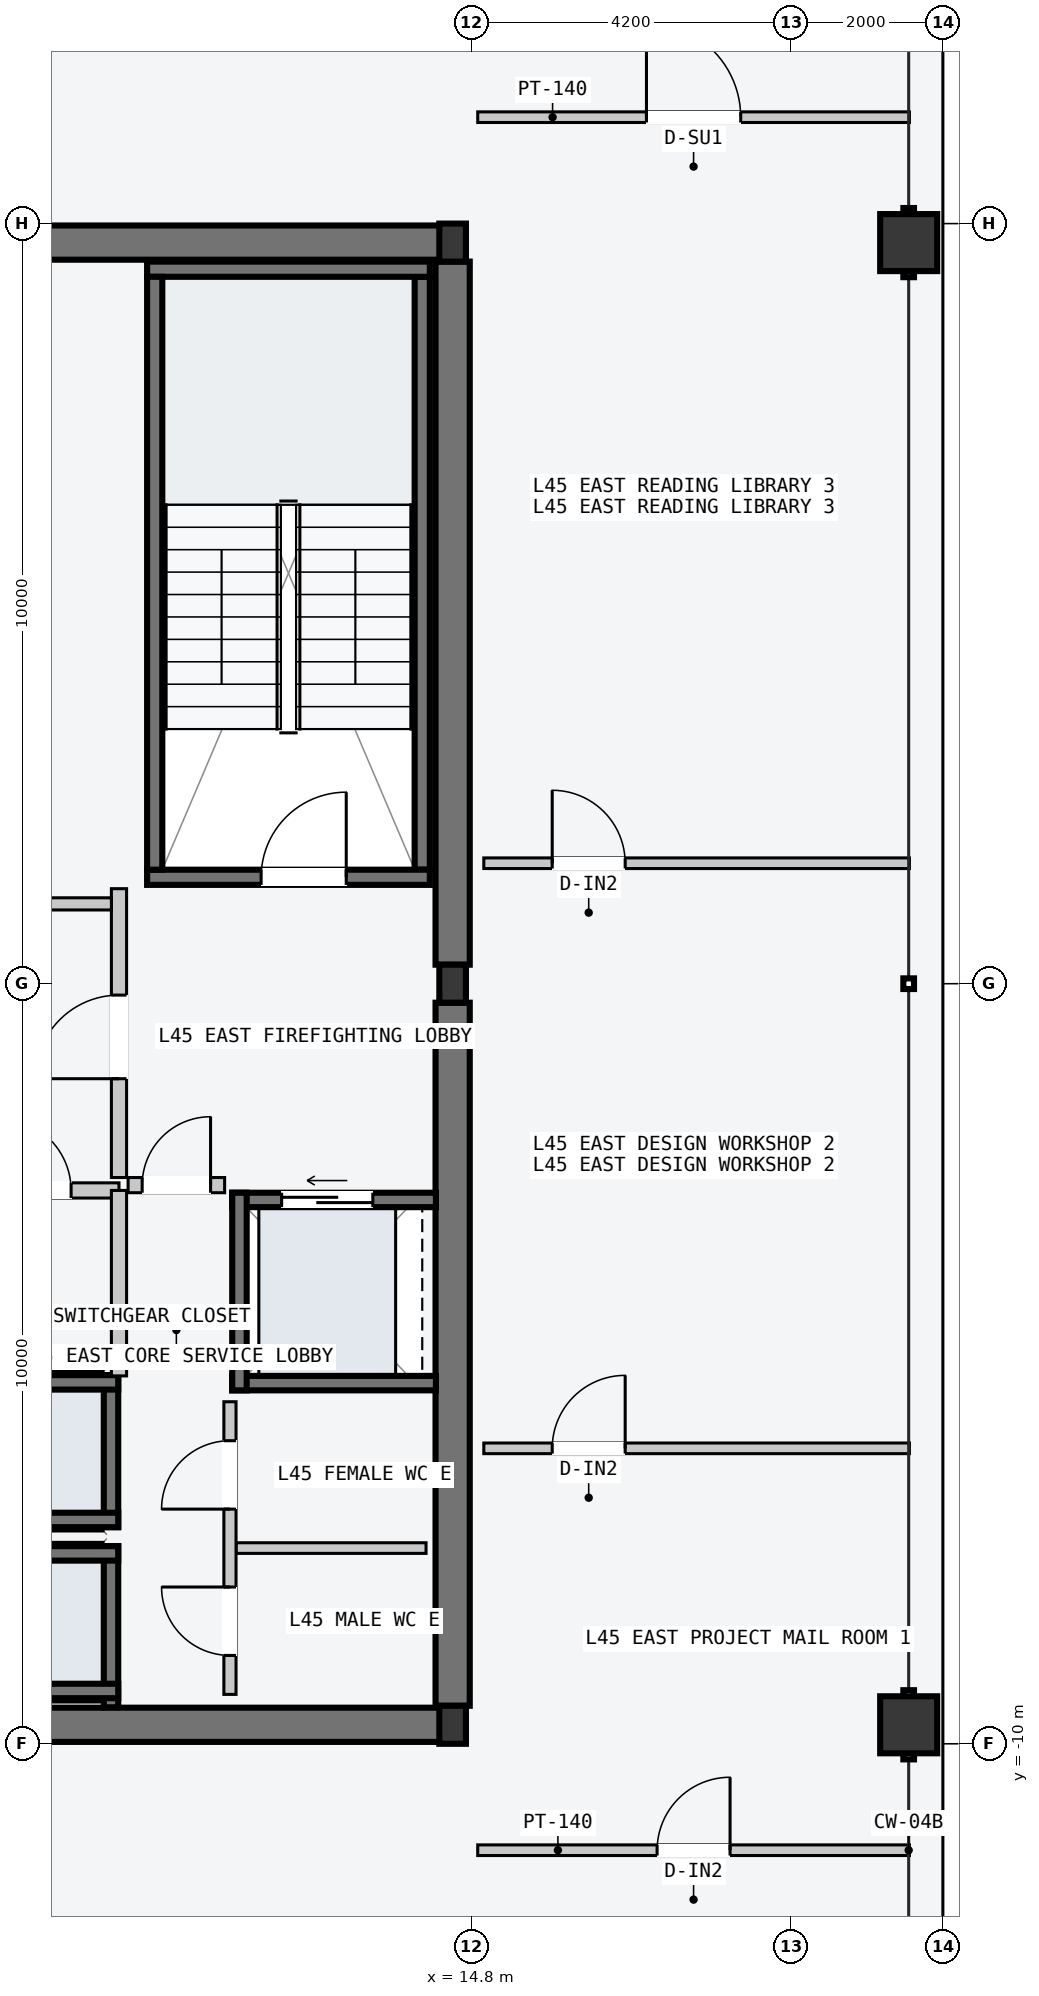
"""IFC4 building model, lengths in metres.
Left out: names, types, materials, properties, quantities, classifications, styles, units other than length and angle.
Written with IfcOpenShell. Run it as: python <this file> out.ifc"""

import sys

from ifc_helpers import new_model, si_unit, direction, frame, frame_2d, origin, origin_2d, place, context, subcontext, project, spatial, rectangle, hollow_rectangle, i_section, extrude, element, fill, save


model = new_model("IFC4")
c1 = context("Model", 3, precision=1e-05, world=origin(), true_north=direction((0.0, 1.0)))
c2 = subcontext(c1, "Body", "Model", "MODEL_VIEW")
j1 = project(units=[si_unit("LENGTHUNIT", "METRE"), si_unit("PLANEANGLEUNIT", "RADIAN")], contexts=[c1])
p1 = place(None, origin())
s1 = spatial("IfcSite", under=j1, at=p1, CompositionType="ELEMENT")
p2 = place(p1, origin())
s2 = spatial("IfcBuilding", under=s1, at=p2, CompositionType="ELEMENT")
p3 = place(p2, frame((0.0, 0.0, 173.1)))
s3 = spatial("IfcBuildingStorey", under=s2, at=p3, CompositionType="ELEMENT", Elevation=173.1)
for number, where, z_axis, x_axis in (
    (1, (8.07, -9.75, -0.2), (0.0, 0.0, 1.0), (1.0, 0.0, 0.0)),
    (2, (8.07, 9.75, -0.2), (0.0, 0.0, 1.0), (1.0, 0.0, 0.0)),
):
    element("IfcWall", number, at=place(p3, frame(where, z_axis=z_axis, x_axis=x_axis)), inside=s3, PredefinedType="SHEAR", context=c2, shape_type="SweptSolid", body=[
        extrude(rectangle(XDim=6.46, YDim=0.45, at=frame_2d((3.23, 0.0))), origin(), (0.0, 0.0, 1.0), 3.6),
    ])
for number, where, z_axis, x_axis in (
    (3, (14.55, -9.5, -0.2), (0.0, 0.0, 1.0), (0.0, 1.0, 0.0)),
    (4, (14.55, 0.25, -0.2), (0.0, 0.0, 1.0), (0.0, 1.0, 0.0)),
):
    element("IfcWall", number, at=place(p3, frame(where, z_axis=z_axis, x_axis=x_axis)), inside=s3, PredefinedType="SHEAR", context=c2, shape_type="SweptSolid", body=[
        extrude(rectangle(XDim=9.25, YDim=0.45, at=frame_2d((4.625, 0.0))), origin(), (0.0, 0.0, 1.0), 3.6),
    ])
p4 = place(p3, frame((14.15, 1.5, -0.2), z_axis=(0.0, 0.0, 1.0), x_axis=(0.0, 1.0, 0.0)))
e5 = element("IfcWall", 5, at=p4, inside=s3, PredefinedType="SOLIDWALL", context=c2, shape_type="SweptSolid", body=[
    extrude(rectangle(XDim=7.8, YDim=0.2, at=frame_2d((3.9, 0.0))), origin(), (0.0, 0.0, 1.0), 3.6),
])
p5 = place(p3, frame((10.53, 1.4, -0.2), z_axis=(0.0, 0.0, 1.0), x_axis=(1.0, 0.0, 0.0)))
e6 = element("IfcWall", 6, at=p5, inside=s3, PredefinedType="SOLIDWALL", context=c2, shape_type="SweptSolid", body=[
    extrude(rectangle(XDim=3.72, YDim=0.2, at=frame_2d((1.86, 0.0))), origin(), (0.0, 0.0, 1.0), 3.6),
])
p6 = place(p5, frame((1.5, 0.0, 0.2)))
e7 = element("IfcOpeningElement", 7, at=p6, cuts=e6, PredefinedType="OPENING", context=c2, shape_type="SweptSolid", body=[
    extrude(rectangle(XDim=1.12, YDim=2.18, at=frame_2d((0.56, 1.09))), frame((0.0, 0.11, 0.0), z_axis=(0.0, -1.0, 0.0), x_axis=(1.0, 0.0, 0.0)), (0.0, 0.0, 1.0), 0.22),
])
p7 = place(p3, frame((10.53, 9.4, -0.2), z_axis=(0.0, 0.0, 1.0), x_axis=(1.0, 0.0, 0.0)))
e8 = element("IfcWall", 8, at=p7, inside=s3, PredefinedType="SOLIDWALL", context=c2, shape_type="SweptSolid", body=[
    extrude(rectangle(XDim=3.72, YDim=0.2, at=frame_2d((1.86, 0.0))), origin(), (0.0, 0.0, 1.0), 3.6),
])
p8 = place(p3, frame((10.63, 1.5, -0.2), z_axis=(0.0, 0.0, 1.0), x_axis=(0.0, 1.0, 0.0)))
e9 = element("IfcWall", 9, at=p8, inside=s3, PredefinedType="SOLIDWALL", context=c2, shape_type="SweptSolid", body=[
    extrude(rectangle(XDim=7.8, YDim=0.2, at=frame_2d((3.9, 0.0))), origin(), (0.0, 0.0, 1.0), 3.6),
])
for number, where, z_axis, x_axis in (
    (10, (14.55, -9.75, 0.0), (0.0, 0.0, 1.0), (1.0, 0.0, 0.0)),
    (11, (14.55, 0.0, 0.0), (0.0, 0.0, 1.0), (1.0, 0.0, 0.0)),
    (12, (14.55, 9.75, 0.0), (0.0, 0.0, 1.0), (1.0, 0.0, 0.0)),
):
    element("IfcColumn", number, at=place(p3, frame(where, z_axis=z_axis, x_axis=x_axis)), inside=s3, PredefinedType="COLUMN", context=c2, shape_type="SweptSolid", body=[
        extrude(i_section(OverallWidth=0.35, OverallDepth=0.5, WebThickness=0.02, FlangeThickness=0.032, at=origin_2d()), origin(), (0.0, 0.0, 1.0), 3.6),
    ])
for number, where, z_axis, x_axis in (
    (13, (20.55, -9.75, 0.0), (0.0, 0.0, 1.0), (0.0, 1.0, 0.0)),
    (14, (20.55, 9.75, 0.0), (0.0, 0.0, 1.0), (0.0, 1.0, 0.0)),
):
    element("IfcColumn", number, at=place(p3, frame(where, z_axis=z_axis, x_axis=x_axis)), inside=s3, PredefinedType="COLUMN", context=c2, shape_type="SweptSolid", body=[
        extrude(hollow_rectangle(XDim=0.75, YDim=0.75, WallThickness=0.032, at=origin_2d()), origin(), (0.0, 0.0, 1.0), 3.6),
    ])
p9 = place(p3, frame((10.055, -9.52, -0.2), z_axis=(0.0, 0.0, 1.0), x_axis=(0.0, 1.0, 0.0)))
e15 = element("IfcWall", 15, at=p9, inside=s3, PredefinedType="SOLIDWALL", context=c2, shape_type="SweptSolid", body=[
    extrude(rectangle(XDim=2.12, YDim=0.19, at=frame_2d((1.06, 0.0))), origin(), (0.0, 0.0, 1.0), 3.6),
])
for number, where, z_axis, x_axis in (
    (16, (7.95, -7.495, -0.2), (0.0, 0.0, 1.0), (1.0, 0.0, 0.0)),
    (17, (7.95, -9.305, -0.2), (0.0, 0.0, 1.0), (1.0, 0.0, 0.0)),
):
    element("IfcWall", number, at=place(p3, frame(where, z_axis=z_axis, x_axis=x_axis)), inside=s3, PredefinedType="SOLIDWALL", context=c2, shape_type="SweptSolid", body=[
        extrude(rectangle(XDim=2.2, YDim=0.19, at=frame_2d((1.1, 0.0))), origin(), (0.0, 0.0, 1.0), 3.6),
    ])
p10 = place(p3, frame((10.055, -7.15, -0.2), z_axis=(0.0, 0.0, 1.0), x_axis=(0.0, 1.0, 0.0)))
e18 = element("IfcWall", 18, at=p10, inside=s3, PredefinedType="SOLIDWALL", context=c2, shape_type="SweptSolid", body=[
    extrude(rectangle(XDim=2.0, YDim=0.19, at=frame_2d((1.0, 0.0))), origin(), (0.0, 0.0, 1.0), 3.6),
])
for number, where, z_axis, x_axis in (
    (19, (7.95, -5.245, -0.2), (0.0, 0.0, 1.0), (1.0, 0.0, 0.0)),
    (20, (7.95, -7.055, -0.2), (0.0, 0.0, 1.0), (1.0, 0.0, 0.0)),
):
    element("IfcWall", number, at=place(p3, frame(where, z_axis=z_axis, x_axis=x_axis)), inside=s3, PredefinedType="SOLIDWALL", context=c2, shape_type="SweptSolid", body=[
        extrude(rectangle(XDim=2.2, YDim=0.19, at=frame_2d((1.1, 0.0))), origin(), (0.0, 0.0, 1.0), 3.6),
    ])
p11 = place(p3, frame((11.65, -2.845, -0.2), z_axis=(0.0, 0.0, 1.0), x_axis=(1.0, 0.0, 0.0)))
e21 = element("IfcWall", 21, at=p11, inside=s3, PredefinedType="SOLIDWALL", context=c2, shape_type="SweptSolid", body=[
    extrude(rectangle(XDim=2.68, YDim=0.19, at=frame_2d((1.34, 0.0))), origin(), (0.0, 0.0, 1.0), 3.6),
])
p12 = place(p11, frame((0.65, 0.0, 0.2)))
e22 = element("IfcOpeningElement", 22, at=p12, cuts=e21, PredefinedType="OPENING", context=c2, shape_type="SweptSolid", body=[
    extrude(rectangle(XDim=1.2, YDim=2.2, at=frame_2d((0.6, 1.1))), frame((0.0, 0.105, 0.0), z_axis=(0.0, -1.0, 0.0), x_axis=(1.0, 0.0, 0.0)), (0.0, 0.0, 1.0), 0.21),
])
p13 = place(p3, frame((11.65, -5.255, -0.2), z_axis=(0.0, 0.0, 1.0), x_axis=(1.0, 0.0, 0.0)))
e23 = element("IfcWall", 23, at=p13, inside=s3, PredefinedType="SOLIDWALL", context=c2, shape_type="SweptSolid", body=[
    extrude(rectangle(XDim=2.68, YDim=0.19, at=frame_2d((1.34, 0.0))), origin(), (0.0, 0.0, 1.0), 3.6),
])
p14 = place(p3, frame((11.745, -5.35, -0.2), z_axis=(0.0, 0.0, 1.0), x_axis=(0.0, 1.0, 0.0)))
e24 = element("IfcWall", 24, at=p14, inside=s3, PredefinedType="SOLIDWALL", context=c2, shape_type="SweptSolid", body=[
    extrude(rectangle(XDim=2.6, YDim=0.19, at=frame_2d((1.3, 0.0))), origin(), (0.0, 0.0, 1.0), 3.6),
])
p15 = place(p3, frame((10.16, -2.55, 0.0), z_axis=(0.0, 0.0, 1.0), x_axis=(0.0, 1.0, 0.0)))
e25 = element("IfcWall", 25, at=p15, inside=s3, PredefinedType="PARTITIONING", context=c2, shape_type="SweptSolid", body=[
    extrude(rectangle(XDim=3.8, YDim=0.2, at=frame_2d((1.9, 0.0))), origin(), (0.0, 0.0, 1.0), 3.4),
])
p16 = place(p15, frame((1.3, 0.0, 0.0)))
e26 = element("IfcOpeningElement", 26, at=p16, cuts=e25, PredefinedType="OPENING", context=c2, shape_type="SweptSolid", body=[
    extrude(rectangle(XDim=1.1, YDim=2.15, at=frame_2d((0.55, 1.075))), frame((0.0, 0.11, 0.0), z_axis=(0.0, -1.0, 0.0), x_axis=(1.0, 0.0, 0.0)), (0.0, 0.0, 1.0), 0.22),
])
p17 = place(p3, frame((10.28, -2.65, 0.0), z_axis=(0.0, 0.0, 1.0), x_axis=(1.0, 0.0, 0.0)))
e27 = element("IfcWall", 27, at=p17, inside=s3, PredefinedType="PARTITIONING", context=c2, shape_type="SweptSolid", body=[
    extrude(rectangle(XDim=1.27, YDim=0.2, at=frame_2d((0.635, 0.0))), origin(), (0.0, 0.0, 1.0), 3.4),
])
p18 = place(p17, frame((0.185, 0.0, 0.0)))
e28 = element("IfcOpeningElement", 28, at=p18, cuts=e27, PredefinedType="OPENING", context=c2, shape_type="SweptSolid", body=[
    extrude(rectangle(XDim=0.9, YDim=2.15, at=frame_2d((0.45, 1.075))), frame((0.0, 0.11, 0.0), z_axis=(0.0, -1.0, 0.0), x_axis=(1.0, 0.0, 0.0)), (0.0, 0.0, 1.0), 0.22),
])
p19 = place(p3, frame((7.96, -2.72, 0.0), z_axis=(0.0, 0.0, 1.0), x_axis=(1.0, 0.0, 0.0)))
e29 = element("IfcWall", 29, at=p19, inside=s3, PredefinedType="PARTITIONING", context=c2, shape_type="SweptSolid", body=[
    extrude(rectangle(XDim=2.2, YDim=0.2, at=frame_2d((1.1, 0.0))), origin(), (0.0, 0.0, 1.0), 3.4),
])
p20 = place(p19, frame((0.62, 0.0, 0.0)))
e30 = element("IfcOpeningElement", 30, at=p20, cuts=e29, PredefinedType="OPENING", context=c2, shape_type="SweptSolid", body=[
    extrude(rectangle(XDim=0.95, YDim=2.1, at=frame_2d((0.475, 1.05))), frame((0.0, 0.11, 0.0), z_axis=(0.0, -1.0, 0.0), x_axis=(1.0, 0.0, 0.0)), (0.0, 0.0, 1.0), 0.22),
])
p21 = place(p3, frame((10.16, -5.16, 0.0), z_axis=(0.0, 0.0, 1.0), x_axis=(0.0, 1.0, 0.0)))
e31 = element("IfcWall", 31, at=p21, inside=s3, PredefinedType="PARTITIONING", context=c2, shape_type="SweptSolid", body=[
    extrude(rectangle(XDim=2.44, YDim=0.2, at=frame_2d((1.22, 0.0))), origin(), (0.0, 0.0, 1.0), 3.4),
])
p22 = place(p3, frame((11.7, -7.425, 0.0), z_axis=(0.0, 0.0, 1.0), x_axis=(1.0, 0.0, 0.0)))
e32 = element("IfcWall", 32, at=p22, inside=s3, PredefinedType="PARTITIONING", context=c2, shape_type="SweptSolid", body=[
    extrude(rectangle(XDim=2.5, YDim=0.14, at=frame_2d((1.25, 0.0))), origin(), (0.0, 0.0, 1.0), 3.4),
])
p23 = place(p3, frame((11.62, -9.35, 0.0), z_axis=(0.0, 0.0, 1.0), x_axis=(0.0, 1.0, 0.0)))
e33 = element("IfcWall", 33, at=p23, inside=s3, PredefinedType="PARTITIONING", context=c2, shape_type="SweptSolid", body=[
    extrude(rectangle(XDim=3.85, YDim=0.16, at=frame_2d((1.925, 0.0))), origin(), (0.0, 0.0, 1.0), 3.4),
])
p24 = place(p23, frame((0.512, 0.0, 0.0)))
e34 = element("IfcOpeningElement", 34, at=p24, cuts=e33, PredefinedType="OPENING", context=c2, shape_type="SweptSolid", body=[
    extrude(rectangle(XDim=0.9, YDim=2.15, at=frame_2d((0.45, 1.075))), frame((0.0, 0.09, 0.0), z_axis=(0.0, -1.0, 0.0), x_axis=(1.0, 0.0, 0.0)), (0.0, 0.0, 1.0), 0.18),
])
p25 = place(p23, frame((2.438, 0.0, 0.0)))
e35 = element("IfcOpeningElement", 35, at=p25, cuts=e33, PredefinedType="OPENING", context=c2, shape_type="SweptSolid", body=[
    extrude(rectangle(XDim=0.9, YDim=2.15, at=frame_2d((0.45, 1.075))), frame((0.0, 0.09, 0.0), z_axis=(0.0, -1.0, 0.0), x_axis=(1.0, 0.0, 0.0)), (0.0, 0.0, 1.0), 0.18),
])
p26 = place(p3, frame((1.26, 1.05, 0.0), z_axis=(0.0, 0.0, 1.0), x_axis=(1.0, 0.0, 0.0)))
e36 = element("IfcWall", 36, at=p26, inside=s3, PredefinedType="PARTITIONING", context=c2, shape_type="SweptSolid", body=[
    extrude(rectangle(XDim=8.8, YDim=0.16, at=frame_2d((4.4, 0.0))), origin(), (0.0, 0.0, 1.0), 3.4),
])
p27 = place(p3, frame((14.88, 11.4, 0.0), z_axis=(0.0, 0.0, 1.0), x_axis=(1.0, 0.0, 0.0)))
e37 = element("IfcWall", 37, at=p27, inside=s3, PredefinedType="PARTITIONING", context=c2, shape_type="SweptSolid", body=[
    extrude(rectangle(XDim=5.68, YDim=0.14, at=frame_2d((2.84, 0.0))), origin(), (0.0, 0.0, 1.0), 3.4),
])
p28 = place(p27, frame((2.22, 0.0, 0.0)))
e38 = element("IfcOpeningElement", 38, at=p28, cuts=e37, PredefinedType="OPENING", context=c2, shape_type="SweptSolid", body=[
    extrude(rectangle(XDim=1.24, YDim=2.24, at=frame_2d((0.62, 1.12))), frame((0.0, 0.08, 0.0), z_axis=(0.0, -1.0, 0.0), x_axis=(1.0, 0.0, 0.0)), (0.0, 0.0, 1.0), 0.16),
])
p29 = place(p3, frame((14.88, -11.4, 0.0), z_axis=(0.0, 0.0, 1.0), x_axis=(1.0, 0.0, 0.0)))
e39 = element("IfcWall", 39, at=p29, inside=s3, PredefinedType="PARTITIONING", context=c2, shape_type="SweptSolid", body=[
    extrude(rectangle(XDim=5.68, YDim=0.14, at=frame_2d((2.84, 0.0))), origin(), (0.0, 0.0, 1.0), 3.4),
])
p30 = place(p29, frame((2.36, 0.0, 0.0)))
e40 = element("IfcOpeningElement", 40, at=p30, cuts=e39, PredefinedType="OPENING", context=c2, shape_type="SweptSolid", body=[
    extrude(rectangle(XDim=0.96, YDim=2.18, at=frame_2d((0.48, 1.09))), frame((0.0, 0.08, 0.0), z_axis=(0.0, -1.0, 0.0), x_axis=(1.0, 0.0, 0.0)), (0.0, 0.0, 1.0), 0.16),
])
p31 = place(p3, frame((14.96, -6.113, 0.0), z_axis=(0.0, 0.0, 1.0), x_axis=(1.0, 0.0, 0.0)))
e41 = element("IfcWall", 41, at=p31, inside=s3, PredefinedType="PARTITIONING", context=c2, shape_type="SweptSolid", body=[
    extrude(rectangle(XDim=5.6, YDim=0.14, at=frame_2d((2.8, 0.0))), origin(), (0.0, 0.0, 1.0), 3.4),
])
p32 = place(p31, frame((0.9, 0.0, 0.0)))
e42 = element("IfcOpeningElement", 42, at=p32, cuts=e41, PredefinedType="OPENING", context=c2, shape_type="SweptSolid", body=[
    extrude(rectangle(XDim=0.96, YDim=2.18, at=frame_2d((0.48, 1.09))), frame((0.0, 0.08, 0.0), z_axis=(0.0, -1.0, 0.0), x_axis=(1.0, 0.0, 0.0)), (0.0, 0.0, 1.0), 0.16),
])
p33 = place(p3, frame((14.96, 1.585, 0.0), z_axis=(0.0, 0.0, 1.0), x_axis=(1.0, 0.0, 0.0)))
e43 = element("IfcWall", 43, at=p33, inside=s3, PredefinedType="PARTITIONING", context=c2, shape_type="SweptSolid", body=[
    extrude(rectangle(XDim=5.6, YDim=0.14, at=frame_2d((2.8, 0.0))), origin(), (0.0, 0.0, 1.0), 3.4),
])
p34 = place(p33, frame((0.9, 0.0, 0.0)))
e44 = element("IfcOpeningElement", 44, at=p34, cuts=e43, PredefinedType="OPENING", context=c2, shape_type="SweptSolid", body=[
    extrude(rectangle(XDim=0.96, YDim=2.18, at=frame_2d((0.48, 1.09))), frame((0.0, 0.08, 0.0), z_axis=(0.0, -1.0, 0.0), x_axis=(1.0, 0.0, 0.0)), (0.0, 0.0, 1.0), 0.16),
])
p35 = place(p6, origin())
e45 = element("IfcDoor", 45, at=p35, inside=s3, OperationType="SINGLE_SWING_RIGHT", PredefinedType="DOOR", context=c2, shape_type="SweptSolid", body=[
    extrude(rectangle(XDim=1.12, YDim=2.18, at=frame_2d((0.56, 1.09))), frame((0.0, 0.025, 0.0), z_axis=(0.0, -1.0, 0.0), x_axis=(1.0, 0.0, 0.0)), (0.0, 0.0, 1.0), 0.05),
])
fill(e7, e45)
p36 = place(p12, origin())
e46 = element("IfcDoor", 46, at=p36, inside=s3, OperationType="SLIDING_TO_LEFT", PredefinedType="DOOR", context=c2, shape_type="SweptSolid", body=[
    extrude(rectangle(XDim=1.2, YDim=2.2, at=frame_2d((0.6, 1.1))), frame((0.0, 0.025, 0.0), z_axis=(0.0, -1.0, 0.0), x_axis=(1.0, 0.0, 0.0)), (0.0, 0.0, 1.0), 0.05),
])
fill(e22, e46)
p37 = place(p16, origin())
e47 = element("IfcDoor", 47, at=p37, inside=s3, OperationType="SINGLE_SWING_LEFT", PredefinedType="DOOR", context=c2, shape_type="SweptSolid", body=[
    extrude(rectangle(XDim=1.1, YDim=2.15, at=frame_2d((0.55, 1.075))), frame((0.0, 0.025, 0.0), z_axis=(0.0, -1.0, 0.0), x_axis=(1.0, 0.0, 0.0)), (0.0, 0.0, 1.0), 0.05),
])
fill(e26, e47)
p38 = place(p18, origin())
e48 = element("IfcDoor", 48, at=p38, inside=s3, OperationType="SINGLE_SWING_RIGHT", PredefinedType="DOOR", context=c2, shape_type="SweptSolid", body=[
    extrude(rectangle(XDim=0.9, YDim=2.15, at=frame_2d((0.45, 1.075))), frame((0.0, 0.025, 0.0), z_axis=(0.0, -1.0, 0.0), x_axis=(1.0, 0.0, 0.0)), (0.0, 0.0, 1.0), 0.05),
])
fill(e28, e48)
p39 = place(p20, origin())
e49 = element("IfcDoor", 49, at=p39, inside=s3, OperationType="SINGLE_SWING_LEFT", PredefinedType="DOOR", context=c2, shape_type="SweptSolid", body=[
    extrude(rectangle(XDim=0.95, YDim=2.1, at=frame_2d((0.475, 1.05))), frame((0.0, 0.025, 0.0), z_axis=(0.0, -1.0, 0.0), x_axis=(1.0, 0.0, 0.0)), (0.0, 0.0, 1.0), 0.05),
])
fill(e30, e49)
p40 = place(p24, origin())
e50 = element("IfcDoor", 50, at=p40, inside=s3, OperationType="SINGLE_SWING_RIGHT", PredefinedType="DOOR", context=c2, shape_type="SweptSolid", body=[
    extrude(rectangle(XDim=0.9, YDim=2.15, at=frame_2d((0.45, 1.075))), frame((0.0, 0.025, 0.0), z_axis=(0.0, -1.0, 0.0), x_axis=(1.0, 0.0, 0.0)), (0.0, 0.0, 1.0), 0.05),
])
fill(e34, e50)
p41 = place(p25, origin())
e51 = element("IfcDoor", 51, at=p41, inside=s3, OperationType="SINGLE_SWING_LEFT", PredefinedType="DOOR", context=c2, shape_type="SweptSolid", body=[
    extrude(rectangle(XDim=0.9, YDim=2.15, at=frame_2d((0.45, 1.075))), frame((0.0, 0.025, 0.0), z_axis=(0.0, -1.0, 0.0), x_axis=(1.0, 0.0, 0.0)), (0.0, 0.0, 1.0), 0.05),
])
fill(e35, e51)
p42 = place(p28, origin())
e52 = element("IfcDoor", 52, at=p42, inside=s3, OperationType="SINGLE_SWING_LEFT", PredefinedType="DOOR", context=c2, shape_type="SweptSolid", body=[
    extrude(rectangle(XDim=1.24, YDim=2.24, at=frame_2d((0.62, 1.12))), frame((0.0, 0.025, 0.0), z_axis=(0.0, -1.0, 0.0), x_axis=(1.0, 0.0, 0.0)), (0.0, 0.0, 1.0), 0.05),
])
fill(e38, e52)
p43 = place(p30, origin())
e53 = element("IfcDoor", 53, at=p43, inside=s3, OperationType="SINGLE_SWING_RIGHT", PredefinedType="DOOR", context=c2, shape_type="SweptSolid", body=[
    extrude(rectangle(XDim=0.96, YDim=2.18, at=frame_2d((0.48, 1.09))), frame((0.0, 0.025, 0.0), z_axis=(0.0, -1.0, 0.0), x_axis=(1.0, 0.0, 0.0)), (0.0, 0.0, 1.0), 0.05),
])
fill(e40, e53)
p44 = place(p32, origin())
e54 = element("IfcDoor", 54, at=p44, inside=s3, OperationType="SINGLE_SWING_RIGHT", PredefinedType="DOOR", context=c2, shape_type="SweptSolid", body=[
    extrude(rectangle(XDim=0.96, YDim=2.18, at=frame_2d((0.48, 1.09))), frame((0.0, 0.025, 0.0), z_axis=(0.0, -1.0, 0.0), x_axis=(1.0, 0.0, 0.0)), (0.0, 0.0, 1.0), 0.05),
])
fill(e42, e54)
p45 = place(p34, origin())
e55 = element("IfcDoor", 55, at=p45, inside=s3, OperationType="SINGLE_SWING_LEFT", PredefinedType="DOOR", context=c2, shape_type="SweptSolid", body=[
    extrude(rectangle(XDim=0.96, YDim=2.18, at=frame_2d((0.48, 1.09))), frame((0.0, 0.025, 0.0), z_axis=(0.0, -1.0, 0.0), x_axis=(1.0, 0.0, 0.0)), (0.0, 0.0, 1.0), 0.05),
])
fill(e44, e55)
save(model, sys.argv[1])
